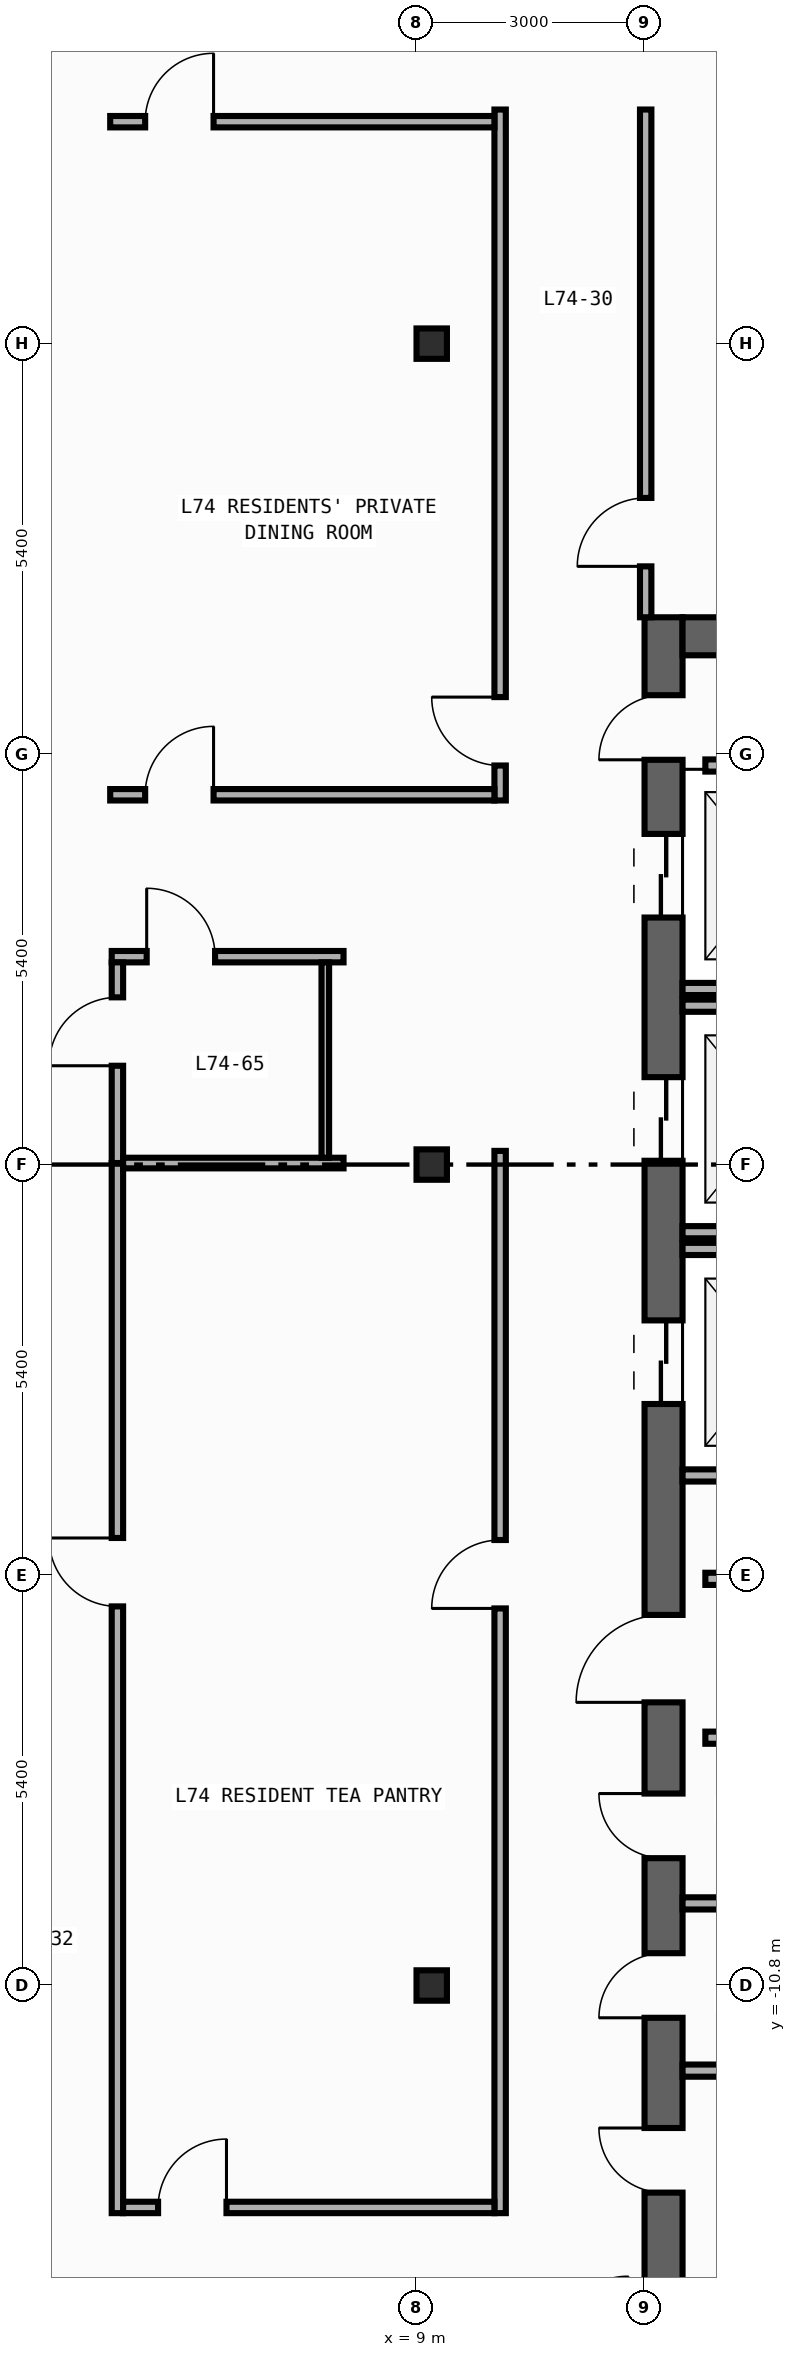
"""IFC4 building model, lengths in metres.
Left out: names, types, materials, properties, quantities, classifications, styles, units other than length and angle.
Written with IfcOpenShell. Run it as: python <this file> out.ifc"""

import sys

from ifc_helpers import new_model, si_unit, direction, frame, frame_2d, origin, origin_2d, place, context, subcontext, project, spatial, rectangle, i_section, extrude, element, fill, save


model = new_model("IFC4")
c1 = context("Model", 3, precision=1e-05, world=origin(), true_north=direction((0.0, 1.0)))
c2 = subcontext(c1, "Body", "Model", "MODEL_VIEW")
j1 = project(units=[si_unit("LENGTHUNIT", "METRE"), si_unit("PLANEANGLEUNIT", "RADIAN")], contexts=[c1])
p1 = place(None, origin())
s1 = spatial("IfcSite", under=j1, at=p1, CompositionType="ELEMENT")
p2 = place(p1, origin())
s2 = spatial("IfcBuilding", under=s1, at=p2, CompositionType="ELEMENT")
p3 = place(p2, frame((0.0, 0.0, 308.0)))
s3 = spatial("IfcBuildingStorey", under=s2, at=p3, CompositionType="ELEMENT", Elevation=308.0)
p4 = place(p3, frame((12.25, -19.8, 0.0), z_axis=(0.0, 0.0, 1.0), x_axis=(0.0, 1.0, 0.0)))
e1 = element("IfcWall", 1, at=p4, inside=s3, PredefinedType="SHEAR", context=c2, shape_type="SweptSolid", body=[
    extrude(rectangle(XDim=27.0, YDim=0.5, at=frame_2d((13.5, 0.0))), origin(), (0.0, 0.0, 1.0), 3.54),
])
p5 = place(p4, frame((23.05, 0.0, 0.0)))
e2 = element("IfcOpeningElement", 2, at=p5, cuts=e1, PredefinedType="OPENING", context=c2, shape_type="SweptSolid", body=[
    extrude(rectangle(XDim=1.1, YDim=2.2, at=frame_2d((0.55, 1.1))), frame((0.0, 0.26, 0.0), z_axis=(0.0, -1.0, 0.0), x_axis=(1.0, 0.0, 0.0)), (0.0, 0.0, 1.0), 0.52),
])
p6 = place(p4, frame((19.85, 0.0, 0.0)))
e3 = element("IfcOpeningElement", 3, at=p6, cuts=e1, PredefinedType="OPENING", context=c2, shape_type="SweptSolid", body=[
    extrude(rectangle(XDim=1.1, YDim=2.2, at=frame_2d((0.55, 1.1))), frame((0.0, 0.26, 0.0), z_axis=(0.0, -1.0, 0.0), x_axis=(1.0, 0.0, 0.0)), (0.0, 0.0, 1.0), 0.52),
])
p7 = place(p4, frame((16.65, 0.0, 0.0)))
e4 = element("IfcOpeningElement", 4, at=p7, cuts=e1, PredefinedType="OPENING", context=c2, shape_type="SweptSolid", body=[
    extrude(rectangle(XDim=1.1, YDim=2.2, at=frame_2d((0.55, 1.1))), frame((0.0, 0.26, 0.0), z_axis=(0.0, -1.0, 0.0), x_axis=(1.0, 0.0, 0.0)), (0.0, 0.0, 1.0), 0.52),
])
p8 = place(p4, frame((6.275, 0.0, 0.0)))
e5 = element("IfcOpeningElement", 5, at=p8, cuts=e1, PredefinedType="OPENING", context=c2, shape_type="SweptSolid", body=[
    extrude(rectangle(XDim=0.85, YDim=2.1, at=frame_2d((0.425, 1.05))), frame((0.0, 0.26, 0.0), z_axis=(0.0, -1.0, 0.0), x_axis=(1.0, 0.0, 0.0)), (0.0, 0.0, 1.0), 0.52),
])
p9 = place(p4, frame((8.575, 0.0, 0.0)))
e6 = element("IfcOpeningElement", 6, at=p9, cuts=e1, PredefinedType="OPENING", context=c2, shape_type="SweptSolid", body=[
    extrude(rectangle(XDim=0.85, YDim=2.1, at=frame_2d((0.425, 1.05))), frame((0.0, 0.26, 0.0), z_axis=(0.0, -1.0, 0.0), x_axis=(1.0, 0.0, 0.0)), (0.0, 0.0, 1.0), 0.52),
])
p10 = place(p4, frame((10.675, 0.0, 0.0)))
e7 = element("IfcOpeningElement", 7, at=p10, cuts=e1, PredefinedType="OPENING", context=c2, shape_type="SweptSolid", body=[
    extrude(rectangle(XDim=0.85, YDim=2.1, at=frame_2d((0.425, 1.05))), frame((0.0, 0.26, 0.0), z_axis=(0.0, -1.0, 0.0), x_axis=(1.0, 0.0, 0.0)), (0.0, 0.0, 1.0), 0.52),
])
p11 = place(p4, frame((12.725, 0.0, 0.0)))
e8 = element("IfcOpeningElement", 8, at=p11, cuts=e1, PredefinedType="OPENING", context=c2, shape_type="SweptSolid", body=[
    extrude(rectangle(XDim=1.15, YDim=2.2, at=frame_2d((0.575, 1.1))), frame((0.0, 0.26, 0.0), z_axis=(0.0, -1.0, 0.0), x_axis=(1.0, 0.0, 0.0)), (0.0, 0.0, 1.0), 0.52),
])
p12 = place(p4, frame((25.125, 0.0, 0.0)))
e9 = element("IfcOpeningElement", 9, at=p12, cuts=e1, PredefinedType="OPENING", context=c2, shape_type="SweptSolid", body=[
    extrude(rectangle(XDim=0.85, YDim=2.1, at=frame_2d((0.425, 1.05))), frame((0.0, 0.26, 0.0), z_axis=(0.0, -1.0, 0.0), x_axis=(1.0, 0.0, 0.0)), (0.0, 0.0, 1.0), 0.52),
])
p13 = place(p3, frame((12.5, 6.95, 0.0), z_axis=(0.0, 0.0, 1.0), x_axis=(1.0, 0.0, 0.0)))
e10 = element("IfcWall", 10, at=p13, inside=s3, PredefinedType="SHEAR", context=c2, shape_type="SweptSolid", body=[
    extrude(rectangle(XDim=7.4, YDim=0.5, at=frame_2d((3.7, 0.0))), origin(), (0.0, 0.0, 1.0), 3.54),
])
for number, where, z_axis, x_axis in (
    (11, (9.2, -10.8, 0.0), (0.0, 0.0, 1.0), (1.0, 0.0, 0.0)),
    (12, (9.2, 0.0, 0.0), (0.0, 0.0, 1.0), (1.0, 0.0, 0.0)),
    (13, (9.2, 10.8, 0.0), (0.0, 0.0, 1.0), (1.0, 0.0, 0.0)),
):
    element("IfcColumn", number, at=place(p3, frame(where, z_axis=z_axis, x_axis=x_axis)), inside=s3, PredefinedType="COLUMN", context=c2, shape_type="SweptSolid", body=[
        extrude(i_section(OverallWidth=0.4, OverallDepth=0.4, WebThickness=0.013, FlangeThickness=0.021, FilletRadius=0.022, at=origin_2d()), origin(), (0.0, 0.0, 1.0), 3.8),
    ])
for number, where, z_axis, x_axis in (
    (14, (12.5, 2.31, 0.0), (0.0, 0.0, 1.0), (1.0, 0.0, 0.0)),
    (15, (12.5, -0.89, 0.0), (0.0, 0.0, 1.0), (1.0, 0.0, 0.0)),
    (16, (12.5, 2.09, 0.0), (0.0, 0.0, 1.0), (1.0, 0.0, 0.0)),
    (17, (12.5, -4.09, 0.0), (0.0, 0.0, 1.0), (1.0, 0.0, 0.0)),
    (18, (12.5, -1.11, 0.0), (0.0, 0.0, 1.0), (1.0, 0.0, 0.0)),
):
    element("IfcWall", number, at=place(p3, frame(where, z_axis=z_axis, x_axis=x_axis)), inside=s3, PredefinedType="STANDARD", context=c2, shape_type="SweptSolid", body=[
        extrude(rectangle(XDim=2.49, YDim=0.16, at=frame_2d((1.245, 0.0))), origin(), (0.0, 0.0, 1.0), 3.54),
    ])
for number, where, z_axis, x_axis in (
    (19, (12.8, -5.45, 0.0), (0.0, 0.0, 1.0), (1.0, 0.0, 0.0)),
    (20, (12.8, -7.54, 0.0), (0.0, 0.0, 1.0), (1.0, 0.0, 0.0)),
    (21, (12.8, 5.25, 0.0), (0.0, 0.0, 1.0), (1.0, 0.0, 0.0)),
):
    element("IfcWall", number, at=place(p3, frame(where, z_axis=z_axis, x_axis=x_axis)), inside=s3, PredefinedType="STANDARD", context=c2, shape_type="SweptSolid", body=[
        extrude(rectangle(XDim=2.6, YDim=0.16, at=frame_2d((1.3, 0.0))), origin(), (0.0, 0.0, 1.0), 3.54),
    ])
for number, where, z_axis, x_axis in (
    (22, (12.5, -11.92, 0.0), (0.0, 0.0, 1.0), (1.0, 0.0, 0.0)),
    (23, (12.5, -9.72, 0.0), (0.0, 0.0, 1.0), (1.0, 0.0, 0.0)),
):
    element("IfcWall", number, at=place(p3, frame(where, z_axis=z_axis, x_axis=x_axis)), inside=s3, PredefinedType="PARTITIONING", context=c2, shape_type="SweptSolid", body=[
        extrude(rectangle(XDim=2.9, YDim=0.16, at=frame_2d((1.45, 0.0))), origin(), (0.0, 0.0, 1.0), 3.54),
    ])
p14 = place(p3, frame((12.015, 7.2, 0.0), z_axis=(0.0, 0.0, 1.0), x_axis=(0.0, 1.0, 0.0)))
e24 = element("IfcWall", 24, at=p14, inside=s3, PredefinedType="PARTITIONING", context=c2, shape_type="SweptSolid", body=[
    extrude(rectangle(XDim=6.68, YDim=0.15, at=frame_2d((3.34, 0.0))), origin(), (0.0, 0.0, 1.0), 3.54),
])
p15 = place(p14, frame((0.67, 0.0, 0.0)))
e25 = element("IfcOpeningElement", 25, at=p15, cuts=e24, PredefinedType="OPENING", context=c2, shape_type="SweptSolid", body=[
    extrude(rectangle(XDim=0.9, YDim=2.15, at=frame_2d((0.45, 1.075))), frame((0.0, 0.085, 0.0), z_axis=(0.0, -1.0, 0.0), x_axis=(1.0, 0.0, 0.0)), (0.0, 0.0, 1.0), 0.17),
])
p16 = place(p3, frame((10.1, 4.79, 0.0), z_axis=(0.0, 0.0, 1.0), x_axis=(0.0, 1.0, 0.0)))
e26 = element("IfcWall", 26, at=p16, inside=s3, PredefinedType="PARTITIONING", context=c2, shape_type="SweptSolid", body=[
    extrude(rectangle(XDim=9.09, YDim=0.15, at=frame_2d((4.545, 0.0))), origin(), (0.0, 0.0, 1.0), 3.54),
])
p17 = place(p16, frame((0.46, 0.0, 0.0)))
e27 = element("IfcOpeningElement", 27, at=p17, cuts=e26, PredefinedType="OPENING", context=c2, shape_type="SweptSolid", body=[
    extrude(rectangle(XDim=0.9, YDim=2.15, at=frame_2d((0.45, 1.075))), frame((0.0, 0.085, 0.0), z_axis=(0.0, -1.0, 0.0), x_axis=(1.0, 0.0, 0.0)), (0.0, 0.0, 1.0), 0.17),
])
p18 = place(p3, frame((10.1, -13.795, 0.0), z_axis=(0.0, 0.0, 1.0), x_axis=(0.0, 1.0, 0.0)))
e28 = element("IfcWall", 28, at=p18, inside=s3, PredefinedType="PARTITIONING", context=c2, shape_type="SweptSolid", body=[
    extrude(rectangle(XDim=13.975, YDim=0.15, at=frame_2d((6.987, 0.0))), origin(), (0.0, 0.0, 1.0), 3.54),
])
p19 = place(p18, frame((7.956, 0.0, 0.0)))
e29 = element("IfcOpeningElement", 29, at=p19, cuts=e28, PredefinedType="OPENING", context=c2, shape_type="SweptSolid", body=[
    extrude(rectangle(XDim=0.9, YDim=2.15, at=frame_2d((0.45, 1.075))), frame((0.0, 0.085, 0.0), z_axis=(0.0, -1.0, 0.0), x_axis=(1.0, 0.0, 0.0)), (0.0, 0.0, 1.0), 0.17),
])
p20 = place(p3, frame((4.97, 4.865, 0.0), z_axis=(0.0, 0.0, 1.0), x_axis=(1.0, 0.0, 0.0)))
e30 = element("IfcWall", 30, at=p20, inside=s3, PredefinedType="PARTITIONING", context=c2, shape_type="SweptSolid", body=[
    extrude(rectangle(XDim=5.055, YDim=0.15, at=frame_2d((2.527, 0.0))), origin(), (0.0, 0.0, 1.0), 3.54),
])
p21 = place(p20, frame((0.46, 0.0, 0.0)))
e31 = element("IfcOpeningElement", 31, at=p21, cuts=e30, PredefinedType="OPENING", context=c2, shape_type="SweptSolid", body=[
    extrude(rectangle(XDim=0.9, YDim=2.15, at=frame_2d((0.45, 1.075))), frame((0.0, 0.085, 0.0), z_axis=(0.0, -1.0, 0.0), x_axis=(1.0, 0.0, 0.0)), (0.0, 0.0, 1.0), 0.17),
])
p22 = place(p3, frame((4.99, 2.735, 0.0), z_axis=(0.0, 0.0, 1.0), x_axis=(1.0, 0.0, 0.0)))
e32 = element("IfcWall", 32, at=p22, inside=s3, PredefinedType="PARTITIONING", context=c2, shape_type="SweptSolid", body=[
    extrude(rectangle(XDim=3.05, YDim=0.15, at=frame_2d((1.525, 0.0))), origin(), (0.0, 0.0, 1.0), 3.54),
])
p23 = place(p22, frame((0.46, 0.0, 0.0)))
e33 = element("IfcOpeningElement", 33, at=p23, cuts=e32, PredefinedType="OPENING", context=c2, shape_type="SweptSolid", body=[
    extrude(rectangle(XDim=0.9, YDim=2.15, at=frame_2d((0.45, 1.075))), frame((0.0, 0.085, 0.0), z_axis=(0.0, -1.0, 0.0), x_axis=(1.0, 0.0, 0.0)), (0.0, 0.0, 1.0), 0.17),
])
p24 = place(p3, frame((5.065, 0.02, 0.0), z_axis=(0.0, 0.0, 1.0), x_axis=(0.0, 1.0, 0.0)))
e34 = element("IfcWall", 34, at=p24, inside=s3, PredefinedType="PARTITIONING", context=c2, shape_type="SweptSolid", body=[
    extrude(rectangle(XDim=2.64, YDim=0.15, at=frame_2d((1.32, 0.0))), origin(), (0.0, 0.0, 1.0), 3.19),
])
p25 = place(p24, frame((1.28, 0.0, 0.0)))
e35 = element("IfcOpeningElement", 35, at=p25, cuts=e34, PredefinedType="OPENING", context=c2, shape_type="SweptSolid", body=[
    extrude(rectangle(XDim=0.9, YDim=2.15, at=frame_2d((0.45, 1.075))), frame((0.0, 0.085, 0.0), z_axis=(0.0, -1.0, 0.0), x_axis=(1.0, 0.0, 0.0)), (0.0, 0.0, 1.0), 0.17),
])
p26 = place(p3, frame((5.065, -13.795, 0.0), z_axis=(0.0, 0.0, 1.0), x_axis=(0.0, 1.0, 0.0)))
e36 = element("IfcWall", 36, at=p26, inside=s3, PredefinedType="PARTITIONING", context=c2, shape_type="SweptSolid", body=[
    extrude(rectangle(XDim=13.815, YDim=0.15, at=frame_2d((6.907, 0.0))), origin(), (0.0, 0.0, 1.0), 3.19),
])
p27 = place(p26, frame((7.982, 0.0, 0.0)))
e37 = element("IfcOpeningElement", 37, at=p27, cuts=e36, PredefinedType="OPENING", context=c2, shape_type="SweptSolid", body=[
    extrude(rectangle(XDim=0.9, YDim=2.15, at=frame_2d((0.45, 1.075))), frame((0.0, 0.085, 0.0), z_axis=(0.0, -1.0, 0.0), x_axis=(1.0, 0.0, 0.0)), (0.0, 0.0, 1.0), 0.17),
])
p28 = place(p3, frame((4.97, 13.72, 0.0), z_axis=(0.0, 0.0, 1.0), x_axis=(1.0, 0.0, 0.0)))
e38 = element("IfcWall", 38, at=p28, inside=s3, PredefinedType="PARTITIONING", context=c2, shape_type="SweptSolid", body=[
    extrude(rectangle(XDim=5.055, YDim=0.15, at=frame_2d((2.527, 0.0))), origin(), (0.0, 0.0, 1.0), 3.54),
])
p29 = place(p28, frame((0.46, 0.0, 0.0)))
e39 = element("IfcOpeningElement", 39, at=p29, cuts=e38, PredefinedType="OPENING", context=c2, shape_type="SweptSolid", body=[
    extrude(rectangle(XDim=0.9, YDim=2.15, at=frame_2d((0.45, 1.075))), frame((0.0, 0.085, 0.0), z_axis=(0.0, -1.0, 0.0), x_axis=(1.0, 0.0, 0.0)), (0.0, 0.0, 1.0), 0.17),
])
p30 = place(p3, frame((5.14, -13.72, 0.0), z_axis=(0.0, 0.0, 1.0), x_axis=(1.0, 0.0, 0.0)))
e40 = element("IfcWall", 40, at=p30, inside=s3, PredefinedType="PARTITIONING", context=c2, shape_type="SweptSolid", body=[
    extrude(rectangle(XDim=4.885, YDim=0.15, at=frame_2d((2.442, 0.0))), origin(), (0.0, 0.0, 1.0), 3.54),
])
p31 = place(p30, frame((0.46, 0.0, 0.0)))
e41 = element("IfcOpeningElement", 41, at=p31, cuts=e40, PredefinedType="OPENING", context=c2, shape_type="SweptSolid", body=[
    extrude(rectangle(XDim=0.9, YDim=2.15, at=frame_2d((0.45, 1.075))), frame((0.0, 0.085, 0.0), z_axis=(0.0, -1.0, 0.0), x_axis=(1.0, 0.0, 0.0)), (0.0, 0.0, 1.0), 0.17),
])
p32 = place(p3, frame((5.14, 0.02, 0.0), z_axis=(0.0, 0.0, 1.0), x_axis=(1.0, 0.0, 0.0)))
e42 = element("IfcWall", 42, at=p32, inside=s3, PredefinedType="PARTITIONING", context=c2, shape_type="SweptSolid", body=[
    extrude(rectangle(XDim=2.9, YDim=0.14, at=frame_2d((1.45, 0.0))), origin(), (0.0, 0.0, 1.0), 2.64),
])
p33 = place(p3, frame((7.8, 2.66, 0.0), z_axis=(0.0, 0.0, 1.0), x_axis=(0.0, -1.0, 0.0)))
e43 = element("IfcWall", 43, at=p33, inside=s3, PredefinedType="PARTITIONING", context=c2, shape_type="SweptSolid", body=[
    extrude(rectangle(XDim=2.57, YDim=0.1, at=frame_2d((1.285, 0.0))), origin(), (0.0, 0.0, 1.0), 3.54),
])
p34 = place(p5, origin())
e44 = element("IfcDoor", 44, at=p34, inside=s3, OperationType="DOUBLE_DOOR_SLIDING", PredefinedType="DOOR", context=c2, shape_type="SweptSolid", body=[
    extrude(rectangle(XDim=1.1, YDim=2.2, at=frame_2d((0.55, 1.1))), frame((0.0, 0.025, 0.0), z_axis=(0.0, -1.0, 0.0), x_axis=(1.0, 0.0, 0.0)), (0.0, 0.0, 1.0), 0.05),
])
fill(e2, e44)
p35 = place(p6, origin())
e45 = element("IfcDoor", 45, at=p35, inside=s3, OperationType="DOUBLE_DOOR_SLIDING", PredefinedType="DOOR", context=c2, shape_type="SweptSolid", body=[
    extrude(rectangle(XDim=1.1, YDim=2.2, at=frame_2d((0.55, 1.1))), frame((0.0, 0.025, 0.0), z_axis=(0.0, -1.0, 0.0), x_axis=(1.0, 0.0, 0.0)), (0.0, 0.0, 1.0), 0.05),
])
fill(e3, e45)
p36 = place(p7, origin())
e46 = element("IfcDoor", 46, at=p36, inside=s3, OperationType="DOUBLE_DOOR_SLIDING", PredefinedType="DOOR", context=c2, shape_type="SweptSolid", body=[
    extrude(rectangle(XDim=1.1, YDim=2.2, at=frame_2d((0.55, 1.1))), frame((0.0, 0.025, 0.0), z_axis=(0.0, -1.0, 0.0), x_axis=(1.0, 0.0, 0.0)), (0.0, 0.0, 1.0), 0.05),
])
fill(e4, e46)
p37 = place(p8, origin())
e47 = element("IfcDoor", 47, at=p37, inside=s3, OperationType="SINGLE_SWING_RIGHT", PredefinedType="DOOR", context=c2, shape_type="SweptSolid", body=[
    extrude(rectangle(XDim=0.85, YDim=2.1, at=frame_2d((0.425, 1.05))), frame((0.0, 0.025, 0.0), z_axis=(0.0, -1.0, 0.0), x_axis=(1.0, 0.0, 0.0)), (0.0, 0.0, 1.0), 0.05),
])
fill(e5, e47)
p38 = place(p9, origin())
e48 = element("IfcDoor", 48, at=p38, inside=s3, OperationType="SINGLE_SWING_LEFT", PredefinedType="DOOR", context=c2, shape_type="SweptSolid", body=[
    extrude(rectangle(XDim=0.85, YDim=2.1, at=frame_2d((0.425, 1.05))), frame((0.0, 0.025, 0.0), z_axis=(0.0, -1.0, 0.0), x_axis=(1.0, 0.0, 0.0)), (0.0, 0.0, 1.0), 0.05),
])
fill(e6, e48)
p39 = place(p10, origin())
e49 = element("IfcDoor", 49, at=p39, inside=s3, OperationType="SINGLE_SWING_RIGHT", PredefinedType="DOOR", context=c2, shape_type="SweptSolid", body=[
    extrude(rectangle(XDim=0.85, YDim=2.1, at=frame_2d((0.425, 1.05))), frame((0.0, 0.025, 0.0), z_axis=(0.0, -1.0, 0.0), x_axis=(1.0, 0.0, 0.0)), (0.0, 0.0, 1.0), 0.05),
])
fill(e7, e49)
p40 = place(p11, origin())
e50 = element("IfcDoor", 50, at=p40, inside=s3, OperationType="SINGLE_SWING_LEFT", PredefinedType="DOOR", context=c2, shape_type="SweptSolid", body=[
    extrude(rectangle(XDim=1.15, YDim=2.2, at=frame_2d((0.575, 1.1))), frame((0.0, 0.025, 0.0), z_axis=(0.0, -1.0, 0.0), x_axis=(1.0, 0.0, 0.0)), (0.0, 0.0, 1.0), 0.05),
])
fill(e8, e50)
p41 = place(p12, origin())
e51 = element("IfcDoor", 51, at=p41, inside=s3, OperationType="SINGLE_SWING_LEFT", PredefinedType="DOOR", context=c2, shape_type="SweptSolid", body=[
    extrude(rectangle(XDim=0.85, YDim=2.1, at=frame_2d((0.425, 1.05))), frame((0.0, 0.025, 0.0), z_axis=(0.0, -1.0, 0.0), x_axis=(1.0, 0.0, 0.0)), (0.0, 0.0, 1.0), 0.05),
])
fill(e9, e51)
p42 = place(p15, origin())
e52 = element("IfcDoor", 52, at=p42, inside=s3, OperationType="SINGLE_SWING_LEFT", PredefinedType="DOOR", context=c2, shape_type="SweptSolid", body=[
    extrude(rectangle(XDim=0.9, YDim=2.15, at=frame_2d((0.45, 1.075))), frame((0.0, 0.025, 0.0), z_axis=(0.0, -1.0, 0.0), x_axis=(1.0, 0.0, 0.0)), (0.0, 0.0, 1.0), 0.05),
])
fill(e25, e52)
p43 = place(p17, origin())
e53 = element("IfcDoor", 53, at=p43, inside=s3, OperationType="SINGLE_SWING_RIGHT", PredefinedType="DOOR", context=c2, shape_type="SweptSolid", body=[
    extrude(rectangle(XDim=0.9, YDim=2.15, at=frame_2d((0.45, 1.075))), frame((0.0, 0.025, 0.0), z_axis=(0.0, -1.0, 0.0), x_axis=(1.0, 0.0, 0.0)), (0.0, 0.0, 1.0), 0.05),
])
fill(e27, e53)
p44 = place(p19, origin())
e54 = element("IfcDoor", 54, at=p44, inside=s3, OperationType="SINGLE_SWING_LEFT", PredefinedType="DOOR", context=c2, shape_type="SweptSolid", body=[
    extrude(rectangle(XDim=0.9, YDim=2.15, at=frame_2d((0.45, 1.075))), frame((0.0, 0.025, 0.0), z_axis=(0.0, -1.0, 0.0), x_axis=(1.0, 0.0, 0.0)), (0.0, 0.0, 1.0), 0.05),
])
fill(e29, e54)
p45 = place(p21, origin())
e55 = element("IfcDoor", 55, at=p45, inside=s3, OperationType="SINGLE_SWING_RIGHT", PredefinedType="DOOR", context=c2, shape_type="SweptSolid", body=[
    extrude(rectangle(XDim=0.9, YDim=2.15, at=frame_2d((0.45, 1.075))), frame((0.0, 0.025, 0.0), z_axis=(0.0, -1.0, 0.0), x_axis=(1.0, 0.0, 0.0)), (0.0, 0.0, 1.0), 0.05),
])
fill(e31, e55)
p46 = place(p23, origin())
e56 = element("IfcDoor", 56, at=p46, inside=s3, OperationType="SINGLE_SWING_LEFT", PredefinedType="DOOR", context=c2, shape_type="SweptSolid", body=[
    extrude(rectangle(XDim=0.9, YDim=2.15, at=frame_2d((0.45, 1.075))), frame((0.0, 0.025, 0.0), z_axis=(0.0, -1.0, 0.0), x_axis=(1.0, 0.0, 0.0)), (0.0, 0.0, 1.0), 0.05),
])
fill(e33, e56)
p47 = place(p25, origin())
e57 = element("IfcDoor", 57, at=p47, inside=s3, OperationType="SINGLE_SWING_LEFT", PredefinedType="DOOR", context=c2, shape_type="SweptSolid", body=[
    extrude(rectangle(XDim=0.9, YDim=2.15, at=frame_2d((0.45, 1.075))), frame((0.0, 0.025, 0.0), z_axis=(0.0, -1.0, 0.0), x_axis=(1.0, 0.0, 0.0)), (0.0, 0.0, 1.0), 0.05),
])
fill(e35, e57)
p48 = place(p27, origin())
e58 = element("IfcDoor", 58, at=p48, inside=s3, OperationType="SINGLE_SWING_RIGHT", PredefinedType="DOOR", context=c2, shape_type="SweptSolid", body=[
    extrude(rectangle(XDim=0.9, YDim=2.15, at=frame_2d((0.45, 1.075))), frame((0.0, 0.025, 0.0), z_axis=(0.0, -1.0, 0.0), x_axis=(1.0, 0.0, 0.0)), (0.0, 0.0, 1.0), 0.05),
])
fill(e37, e58)
p49 = place(p29, origin())
e59 = element("IfcDoor", 59, at=p49, inside=s3, OperationType="SINGLE_SWING_RIGHT", PredefinedType="DOOR", context=c2, shape_type="SweptSolid", body=[
    extrude(rectangle(XDim=0.9, YDim=2.15, at=frame_2d((0.45, 1.075))), frame((0.0, 0.025, 0.0), z_axis=(0.0, -1.0, 0.0), x_axis=(1.0, 0.0, 0.0)), (0.0, 0.0, 1.0), 0.05),
])
fill(e39, e59)
p50 = place(p31, origin())
e60 = element("IfcDoor", 60, at=p50, inside=s3, OperationType="SINGLE_SWING_RIGHT", PredefinedType="DOOR", context=c2, shape_type="SweptSolid", body=[
    extrude(rectangle(XDim=0.9, YDim=2.15, at=frame_2d((0.45, 1.075))), frame((0.0, 0.025, 0.0), z_axis=(0.0, -1.0, 0.0), x_axis=(1.0, 0.0, 0.0)), (0.0, 0.0, 1.0), 0.05),
])
fill(e41, e60)
save(model, sys.argv[1])
